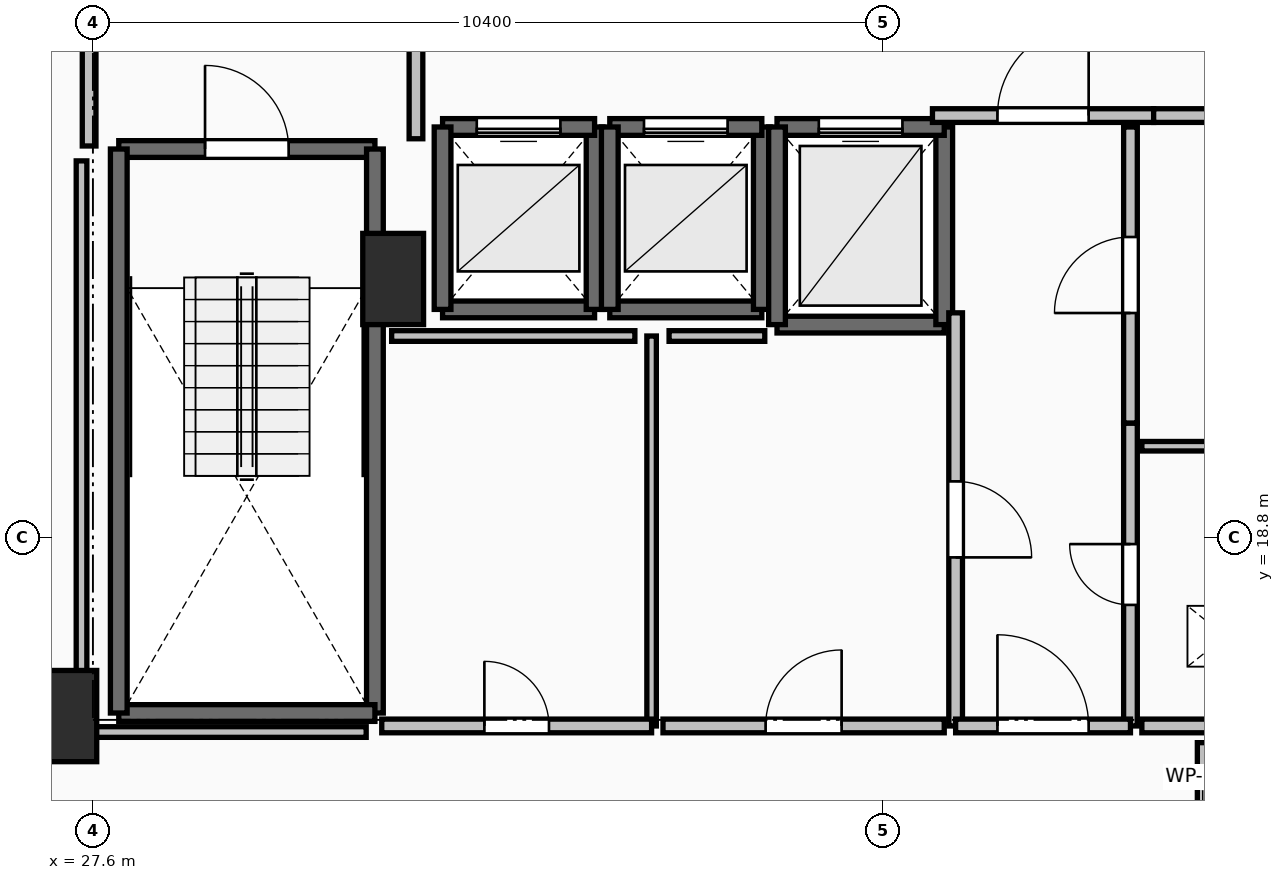
"""IFC4 building model, lengths in metres.
Left out: names, types, materials, properties, quantities, classifications, styles, units other than length and angle.
Written with IfcOpenShell. Run it as: python <this file> out.ifc"""

import sys

from ifc_helpers import new_model, si_unit, direction, frame, frame_2d, origin, origin_2d, place, context, subcontext, project, spatial, rectangle, extrude, element, fill, save


model = new_model("IFC4")
c1 = context("Model", 3, precision=1e-05, world=origin(), true_north=direction((0.0, 1.0)))
c2 = subcontext(c1, "Body", "Model", "MODEL_VIEW")
j1 = project(units=[si_unit("LENGTHUNIT", "METRE"), si_unit("PLANEANGLEUNIT", "RADIAN")], contexts=[c1])
p1 = place(None, origin())
s1 = spatial("IfcSite", under=j1, at=p1, CompositionType="ELEMENT")
p2 = place(p1, origin())
s2 = spatial("IfcBuilding", under=s1, at=p2, CompositionType="ELEMENT")
p3 = place(p2, frame((0.0, 0.0, 132.6)))
s3 = spatial("IfcBuildingStorey", under=s2, at=p3, CompositionType="ELEMENT", Elevation=132.6)
for number, where, z_axis, x_axis in (
    (1, (27.25, 16.45, 0.0), (0.0, 0.0, 1.0), (1.0, 0.0, 0.0)),
    (2, (31.55, 22.2, 0.0), (0.0, 0.0, 1.0), (1.0, 0.0, 0.0)),
):
    element("IfcColumn", number, at=place(p3, frame(where, z_axis=z_axis, x_axis=x_axis)), inside=s3, PredefinedType="PILASTER", context=c2, shape_type="SweptSolid", body=[
        extrude(rectangle(XDim=0.8, YDim=1.2, at=origin_2d()), origin(), (0.0, 0.0, 1.0), 3.5),
    ])
p4 = place(p3, frame((27.94, 23.91, 0.0), z_axis=(0.0, 0.0, 1.0), x_axis=(1.0, 0.0, 0.0)))
e3 = element("IfcWall", 3, at=p4, inside=s3, PredefinedType="SOLIDWALL", context=c2, shape_type="SweptSolid", body=[
    extrude(rectangle(XDim=3.37, YDim=0.22, at=frame_2d((1.685, 0.0))), origin(), (0.0, 0.0, 1.0), 3.24),
])
p5 = place(p4, frame((1.135, 0.0, 0.0)))
e4 = element("IfcOpeningElement", 4, at=p5, cuts=e3, PredefinedType="OPENING", context=c2, shape_type="SweptSolid", body=[
    extrude(rectangle(XDim=1.1, YDim=2.15, at=frame_2d((0.55, 1.075))), frame((0.0, 0.125, 0.0), z_axis=(0.0, -1.0, 0.0), x_axis=(1.0, 0.0, 0.0)), (0.0, 0.0, 1.0), 0.25),
])
p6 = place(p3, frame((31.31, 23.91, 0.0), z_axis=(0.0, 0.0, 1.0), x_axis=(0.0, -1.0, 0.0)))
e5 = element("IfcWall", 5, at=p6, inside=s3, PredefinedType="SOLIDWALL", context=c2, shape_type="SweptSolid", body=[
    extrude(rectangle(XDim=7.42, YDim=0.22, at=frame_2d((3.71, 0.0))), origin(), (0.0, 0.0, 1.0), 3.24),
])
p7 = place(p3, frame((31.31, 16.49, 0.0), z_axis=(0.0, 0.0, 1.0), x_axis=(-1.0, 0.0, 0.0)))
e6 = element("IfcWall", 6, at=p7, inside=s3, PredefinedType="SOLIDWALL", context=c2, shape_type="SweptSolid", body=[
    extrude(rectangle(XDim=3.37, YDim=0.22, at=frame_2d((1.685, 0.0))), origin(), (0.0, 0.0, 1.0), 3.24),
])
p8 = place(p3, frame((27.94, 16.49, 0.0), z_axis=(0.0, 0.0, 1.0), x_axis=(0.0, 1.0, 0.0)))
e7 = element("IfcWall", 7, at=p8, inside=s3, PredefinedType="SOLIDWALL", context=c2, shape_type="SweptSolid", body=[
    extrude(rectangle(XDim=7.42, YDim=0.22, at=frame_2d((3.71, 0.0))), origin(), (0.0, 0.0, 1.0), 3.24),
])
p9 = place(p3, frame((32.2, 21.8, 0.0), z_axis=(0.0, 0.0, 1.0), x_axis=(1.0, 0.0, 0.0)))
e8 = element("IfcWall", 8, at=p9, inside=s3, PredefinedType="SOLIDWALL", context=c2, shape_type="SweptSolid", body=[
    extrude(rectangle(XDim=2.0, YDim=0.22, at=frame_2d((1.0, 0.0))), origin(), (0.0, 0.0, 1.0), 3.24),
])
p10 = place(p3, frame((34.2, 21.8, 0.0), z_axis=(0.0, 0.0, 1.0), x_axis=(0.0, 1.0, 0.0)))
e9 = element("IfcWall", 9, at=p10, inside=s3, PredefinedType="SOLIDWALL", context=c2, shape_type="SweptSolid", body=[
    extrude(rectangle(XDim=2.4, YDim=0.22, at=frame_2d((1.2, 0.0))), origin(), (0.0, 0.0, 1.0), 3.24),
])
p11 = place(p3, frame((34.2, 24.2, 0.0), z_axis=(0.0, 0.0, 1.0), x_axis=(-1.0, 0.0, 0.0)))
e10 = element("IfcWall", 10, at=p11, inside=s3, PredefinedType="SOLIDWALL", context=c2, shape_type="SweptSolid", body=[
    extrude(rectangle(XDim=2.0, YDim=0.22, at=frame_2d((1.0, 0.0))), origin(), (0.0, 0.0, 1.0), 3.24),
])
p12 = place(p11, frame((0.45, 0.0, 0.0)))
e11 = element("IfcOpeningElement", 11, at=p12, cuts=e10, PredefinedType="OPENING", context=c2, shape_type="SweptSolid", body=[
    extrude(rectangle(XDim=1.1, YDim=2.2, at=frame_2d((0.55, 1.1))), frame((0.0, 0.125, 0.0), z_axis=(0.0, -1.0, 0.0), x_axis=(1.0, 0.0, 0.0)), (0.0, 0.0, 1.0), 0.25),
])
p13 = place(p3, frame((32.2, 24.2, 0.0), z_axis=(0.0, 0.0, 1.0), x_axis=(0.0, -1.0, 0.0)))
e12 = element("IfcWall", 12, at=p13, inside=s3, PredefinedType="SOLIDWALL", context=c2, shape_type="SweptSolid", body=[
    extrude(rectangle(XDim=2.4, YDim=0.22, at=frame_2d((1.2, 0.0))), origin(), (0.0, 0.0, 1.0), 3.24),
])
p14 = place(p3, frame((34.4, 21.8, 0.0), z_axis=(0.0, 0.0, 1.0), x_axis=(1.0, 0.0, 0.0)))
e13 = element("IfcWall", 13, at=p14, inside=s3, PredefinedType="SOLIDWALL", context=c2, shape_type="SweptSolid", body=[
    extrude(rectangle(XDim=2.0, YDim=0.22, at=frame_2d((1.0, 0.0))), origin(), (0.0, 0.0, 1.0), 3.24),
])
p15 = place(p3, frame((36.4, 21.8, 0.0), z_axis=(0.0, 0.0, 1.0), x_axis=(0.0, 1.0, 0.0)))
e14 = element("IfcWall", 14, at=p15, inside=s3, PredefinedType="SOLIDWALL", context=c2, shape_type="SweptSolid", body=[
    extrude(rectangle(XDim=2.4, YDim=0.22, at=frame_2d((1.2, 0.0))), origin(), (0.0, 0.0, 1.0), 3.24),
])
p16 = place(p3, frame((36.4, 24.2, 0.0), z_axis=(0.0, 0.0, 1.0), x_axis=(-1.0, 0.0, 0.0)))
e15 = element("IfcWall", 15, at=p16, inside=s3, PredefinedType="SOLIDWALL", context=c2, shape_type="SweptSolid", body=[
    extrude(rectangle(XDim=2.0, YDim=0.22, at=frame_2d((1.0, 0.0))), origin(), (0.0, 0.0, 1.0), 3.24),
])
p17 = place(p16, frame((0.45, 0.0, 0.0)))
e16 = element("IfcOpeningElement", 16, at=p17, cuts=e15, PredefinedType="OPENING", context=c2, shape_type="SweptSolid", body=[
    extrude(rectangle(XDim=1.1, YDim=2.2, at=frame_2d((0.55, 1.1))), frame((0.0, 0.125, 0.0), z_axis=(0.0, -1.0, 0.0), x_axis=(1.0, 0.0, 0.0)), (0.0, 0.0, 1.0), 0.25),
])
p18 = place(p3, frame((34.4, 24.2, 0.0), z_axis=(0.0, 0.0, 1.0), x_axis=(0.0, -1.0, 0.0)))
e17 = element("IfcWall", 17, at=p18, inside=s3, PredefinedType="SOLIDWALL", context=c2, shape_type="SweptSolid", body=[
    extrude(rectangle(XDim=2.4, YDim=0.22, at=frame_2d((1.2, 0.0))), origin(), (0.0, 0.0, 1.0), 3.24),
])
p19 = place(p3, frame((36.6, 21.6, 0.0), z_axis=(0.0, 0.0, 1.0), x_axis=(1.0, 0.0, 0.0)))
e18 = element("IfcWall", 18, at=p19, inside=s3, PredefinedType="SOLIDWALL", context=c2, shape_type="SweptSolid", body=[
    extrude(rectangle(XDim=2.2, YDim=0.22, at=frame_2d((1.1, 0.0))), origin(), (0.0, 0.0, 1.0), 3.24),
])
p20 = place(p3, frame((38.8, 21.6, 0.0), z_axis=(0.0, 0.0, 1.0), x_axis=(0.0, 1.0, 0.0)))
e19 = element("IfcWall", 19, at=p20, inside=s3, PredefinedType="SOLIDWALL", context=c2, shape_type="SweptSolid", body=[
    extrude(rectangle(XDim=2.6, YDim=0.22, at=frame_2d((1.3, 0.0))), origin(), (0.0, 0.0, 1.0), 3.24),
])
p21 = place(p3, frame((38.8, 24.2, 0.0), z_axis=(0.0, 0.0, 1.0), x_axis=(-1.0, 0.0, 0.0)))
e20 = element("IfcWall", 20, at=p21, inside=s3, PredefinedType="SOLIDWALL", context=c2, shape_type="SweptSolid", body=[
    extrude(rectangle(XDim=2.2, YDim=0.22, at=frame_2d((1.1, 0.0))), origin(), (0.0, 0.0, 1.0), 3.24),
])
p22 = place(p21, frame((0.55, 0.0, 0.0)))
e21 = element("IfcOpeningElement", 21, at=p22, cuts=e20, PredefinedType="OPENING", context=c2, shape_type="SweptSolid", body=[
    extrude(rectangle(XDim=1.1, YDim=2.2, at=frame_2d((0.55, 1.1))), frame((0.0, 0.125, 0.0), z_axis=(0.0, -1.0, 0.0), x_axis=(1.0, 0.0, 0.0)), (0.0, 0.0, 1.0), 0.25),
])
p23 = place(p3, frame((36.6, 24.2, 0.0), z_axis=(0.0, 0.0, 1.0), x_axis=(0.0, -1.0, 0.0)))
e22 = element("IfcWall", 22, at=p23, inside=s3, PredefinedType="SOLIDWALL", context=c2, shape_type="SweptSolid", body=[
    extrude(rectangle(XDim=2.6, YDim=0.22, at=frame_2d((1.3, 0.0))), origin(), (0.0, 0.0, 1.0), 3.24),
])
p24 = place(p3, frame((31.85, 24.045, 0.0), z_axis=(0.0, 0.0, 1.0), x_axis=(0.0, 1.0, 0.0)))
e23 = element("IfcWall", 23, at=p24, inside=s3, PredefinedType="PARTITIONING", context=c2, shape_type="SweptSolid", body=[
    extrude(rectangle(XDim=3.91, YDim=0.18, at=frame_2d((1.955, 0.0))), origin(), (0.0, 0.0, 1.0), 3.24),
])
p25 = place(p24, frame((1.355, 0.0, 0.0)))
e24 = element("IfcOpeningElement", 24, at=p25, cuts=e23, PredefinedType="OPENING", context=c2, shape_type="SweptSolid", body=[
    extrude(rectangle(XDim=1.2, YDim=2.15, at=frame_2d((0.6, 1.075))), frame((0.0, 0.105, 0.0), z_axis=(0.0, -1.0, 0.0), x_axis=(1.0, 0.0, 0.0)), (0.0, 0.0, 1.0), 0.21),
])
p26 = place(p3, frame((27.55, 28.0, 0.0), z_axis=(0.0, 0.0, 1.0), x_axis=(0.0, -1.0, 0.0)))
e25 = element("IfcWall", 25, at=p26, inside=s3, PredefinedType="PARTITIONING", context=c2, shape_type="SweptSolid", body=[
    extrude(rectangle(XDim=4.05, YDim=0.18, at=frame_2d((2.025, 0.0))), origin(), (0.0, 0.0, 1.0), 3.24),
])
p27 = place(p26, frame((1.425, 0.0, 0.0)))
e26 = element("IfcOpeningElement", 26, at=p27, cuts=e25, PredefinedType="OPENING", context=c2, shape_type="SweptSolid", body=[
    extrude(rectangle(XDim=1.2, YDim=2.15, at=frame_2d((0.6, 1.075))), frame((0.0, 0.105, 0.0), z_axis=(0.0, -1.0, 0.0), x_axis=(1.0, 0.0, 0.0)), (0.0, 0.0, 1.0), 0.21),
])
p28 = place(p3, frame((38.645, 24.35, 0.0), z_axis=(0.0, 0.0, 1.0), x_axis=(1.0, 0.0, 0.0)))
e27 = element("IfcWall", 27, at=p28, inside=s3, PredefinedType="PARTITIONING", context=c2, shape_type="SweptSolid", body=[
    extrude(rectangle(XDim=2.91, YDim=0.18, at=frame_2d((1.455, 0.0))), origin(), (0.0, 0.0, 1.0), 3.24),
])
p29 = place(p28, frame((0.855, 0.0, 0.0)))
e28 = element("IfcOpeningElement", 28, at=p29, cuts=e27, PredefinedType="OPENING", context=c2, shape_type="SweptSolid", body=[
    extrude(rectangle(XDim=1.2, YDim=2.15, at=frame_2d((0.6, 1.075))), frame((0.0, 0.105, 0.0), z_axis=(0.0, -1.0, 0.0), x_axis=(1.0, 0.0, 0.0)), (0.0, 0.0, 1.0), 0.21),
])
p30 = place(p3, frame((41.555, 24.35, 0.0), z_axis=(0.0, 0.0, 1.0), x_axis=(1.0, 0.0, 0.0)))
e29 = element("IfcWall", 29, at=p30, inside=s3, PredefinedType="PARTITIONING", context=c2, shape_type="SweptSolid", body=[
    extrude(rectangle(XDim=2.445, YDim=0.18, at=frame_2d((1.223, 0.0))), origin(), (0.0, 0.0, 1.0), 3.24),
])
p31 = place(p30, frame((0.722, 0.0, 0.0)))
e30 = element("IfcOpeningElement", 30, at=p31, cuts=e29, PredefinedType="OPENING", context=c2, shape_type="SweptSolid", body=[
    extrude(rectangle(XDim=1.0, YDim=2.15, at=frame_2d((0.5, 1.075))), frame((0.0, 0.105, 0.0), z_axis=(0.0, -1.0, 0.0), x_axis=(1.0, 0.0, 0.0)), (0.0, 0.0, 1.0), 0.21),
])
p32 = place(p3, frame((41.25, 16.32, 0.0), z_axis=(0.0, 0.0, 1.0), x_axis=(0.0, 1.0, 0.0)))
e31 = element("IfcWall", 31, at=p32, inside=s3, PredefinedType="PARTITIONING", context=c2, shape_type="SweptSolid", body=[
    extrude(rectangle(XDim=3.985, YDim=0.18, at=frame_2d((1.992, 0.0))), origin(), (0.0, 0.0, 1.0), 3.24),
])
p33 = place(p32, frame((1.593, 0.0, 0.0)))
e32 = element("IfcOpeningElement", 32, at=p33, cuts=e31, PredefinedType="OPENING", context=c2, shape_type="SweptSolid", body=[
    extrude(rectangle(XDim=0.8, YDim=2.05, at=frame_2d((0.4, 1.025))), frame((0.0, 0.105, 0.0), z_axis=(0.0, -1.0, 0.0), x_axis=(1.0, 0.0, 0.0)), (0.0, 0.0, 1.0), 0.21),
])
p34 = place(p3, frame((41.25, 20.305, 0.0), z_axis=(0.0, 0.0, 1.0), x_axis=(0.0, 1.0, 0.0)))
e33 = element("IfcWall", 33, at=p34, inside=s3, PredefinedType="PARTITIONING", context=c2, shape_type="SweptSolid", body=[
    extrude(rectangle(XDim=3.895, YDim=0.18, at=frame_2d((1.948, 0.0))), origin(), (0.0, 0.0, 1.0), 3.24),
])
p35 = place(p34, frame((1.448, 0.0, 0.0)))
e34 = element("IfcOpeningElement", 34, at=p35, cuts=e33, PredefinedType="OPENING", context=c2, shape_type="SweptSolid", body=[
    extrude(rectangle(XDim=1.0, YDim=2.15, at=frame_2d((0.5, 1.075))), frame((0.0, 0.105, 0.0), z_axis=(0.0, -1.0, 0.0), x_axis=(1.0, 0.0, 0.0)), (0.0, 0.0, 1.0), 0.21),
])
p36 = place(p3, frame((38.95, 21.755, 0.0), z_axis=(0.0, 0.0, 1.0), x_axis=(0.0, -1.0, 0.0)))
e35 = element("IfcWall", 35, at=p36, inside=s3, PredefinedType="PARTITIONING", context=c2, shape_type="SweptSolid", body=[
    extrude(rectangle(XDim=5.435, YDim=0.18, at=frame_2d((2.717, 0.0))), origin(), (0.0, 0.0, 1.0), 3.24),
])
p37 = place(p36, frame((2.218, 0.0, 0.0)))
e36 = element("IfcOpeningElement", 36, at=p37, cuts=e35, PredefinedType="OPENING", context=c2, shape_type="SweptSolid", body=[
    extrude(rectangle(XDim=1.0, YDim=2.15, at=frame_2d((0.5, 1.075))), frame((0.0, 0.105, 0.0), z_axis=(0.0, -1.0, 0.0), x_axis=(1.0, 0.0, 0.0)), (0.0, 0.0, 1.0), 0.21),
])
p38 = place(p3, frame((38.95, 16.32, 0.0), z_axis=(0.0, 0.0, 1.0), x_axis=(1.0, 0.0, 0.0)))
e37 = element("IfcWall", 37, at=p38, inside=s3, PredefinedType="PARTITIONING", context=c2, shape_type="SweptSolid", body=[
    extrude(rectangle(XDim=2.3, YDim=0.18, at=frame_2d((1.15, 0.0))), origin(), (0.0, 0.0, 1.0), 3.24),
])
p39 = place(p38, frame((0.55, 0.0, 0.0)))
e38 = element("IfcOpeningElement", 38, at=p39, cuts=e37, PredefinedType="OPENING", context=c2, shape_type="SweptSolid", body=[
    extrude(rectangle(XDim=1.2, YDim=2.15, at=frame_2d((0.6, 1.075))), frame((0.0, 0.105, 0.0), z_axis=(0.0, -1.0, 0.0), x_axis=(1.0, 0.0, 0.0)), (0.0, 0.0, 1.0), 0.21),
])
p40 = place(p3, frame((44.6, 20.0, 0.0), z_axis=(0.0, 0.0, 1.0), x_axis=(-1.0, 0.0, 0.0)))
e39 = element("IfcWall", 39, at=p40, inside=s3, PredefinedType="PARTITIONING", context=c2, shape_type="SweptSolid", body=[
    extrude(rectangle(XDim=3.2, YDim=0.125, at=frame_2d((1.6, 0.0))), origin(), (0.0, 0.0, 1.0), 3.24),
])
p41 = place(p3, frame((41.4, 16.32, 0.0), z_axis=(0.0, 0.0, 1.0), x_axis=(1.0, 0.0, 0.0)))
e40 = element("IfcWall", 40, at=p41, inside=s3, PredefinedType="PARTITIONING", context=c2, shape_type="SweptSolid", body=[
    extrude(rectangle(XDim=3.2, YDim=0.18, at=frame_2d((1.6, 0.0))), origin(), (0.0, 0.0, 1.0), 3.24),
])
p42 = place(p41, frame((1.2, 0.0, 0.0)))
e41 = element("IfcOpeningElement", 41, at=p42, cuts=e40, PredefinedType="OPENING", context=c2, shape_type="SweptSolid", body=[
    extrude(rectangle(XDim=0.8, YDim=2.05, at=frame_2d((0.4, 1.025))), frame((0.0, 0.105, 0.0), z_axis=(0.0, -1.0, 0.0), x_axis=(1.0, 0.0, 0.0)), (0.0, 0.0, 1.0), 0.21),
])
p43 = place(p3, frame((34.95, 16.32, 0.0), z_axis=(0.0, 0.0, 1.0), x_axis=(0.0, 1.0, 0.0)))
e42 = element("IfcWall", 42, at=p43, inside=s3, PredefinedType="PARTITIONING", context=c2, shape_type="SweptSolid", body=[
    extrude(rectangle(XDim=5.13, YDim=0.125, at=frame_2d((2.565, 0.0))), origin(), (0.0, 0.0, 1.0), 3.24),
])
p44 = place(p3, frame((31.4, 16.32, 0.0), z_axis=(0.0, 0.0, 1.0), x_axis=(1.0, 0.0, 0.0)))
e43 = element("IfcWall", 43, at=p44, inside=s3, PredefinedType="PARTITIONING", context=c2, shape_type="SweptSolid", body=[
    extrude(rectangle(XDim=3.55, YDim=0.18, at=frame_2d((1.775, 0.0))), origin(), (0.0, 0.0, 1.0), 3.24),
])
p45 = place(p44, frame((1.35, 0.0, 0.0)))
e44 = element("IfcOpeningElement", 44, at=p45, cuts=e43, PredefinedType="OPENING", context=c2, shape_type="SweptSolid", body=[
    extrude(rectangle(XDim=0.85, YDim=2.1, at=frame_2d((0.425, 1.05))), frame((0.0, 0.105, 0.0), z_axis=(0.0, -1.0, 0.0), x_axis=(1.0, 0.0, 0.0)), (0.0, 0.0, 1.0), 0.21),
])
p46 = place(p3, frame((35.1, 16.32, 0.0), z_axis=(0.0, 0.0, 1.0), x_axis=(1.0, 0.0, 0.0)))
e45 = element("IfcWall", 45, at=p46, inside=s3, PredefinedType="PARTITIONING", context=c2, shape_type="SweptSolid", body=[
    extrude(rectangle(XDim=3.7, YDim=0.18, at=frame_2d((1.85, 0.0))), origin(), (0.0, 0.0, 1.0), 3.24),
])
p47 = place(p46, frame((1.35, 0.0, 0.0)))
e46 = element("IfcOpeningElement", 46, at=p47, cuts=e45, PredefinedType="OPENING", context=c2, shape_type="SweptSolid", body=[
    extrude(rectangle(XDim=1.0, YDim=2.15, at=frame_2d((0.5, 1.075))), frame((0.0, 0.105, 0.0), z_axis=(0.0, -1.0, 0.0), x_axis=(1.0, 0.0, 0.0)), (0.0, 0.0, 1.0), 0.21),
])
p48 = place(p3, frame((34.73, 21.45, 0.0), z_axis=(0.0, 0.0, 1.0), x_axis=(-1.0, 0.0, 0.0)))
e47 = element("IfcWall", 47, at=p48, inside=s3, PredefinedType="PARTITIONING", context=c2, shape_type="SweptSolid", body=[
    extrude(rectangle(XDim=3.2, YDim=0.14, at=frame_2d((1.6, 0.0))), origin(), (0.0, 0.0, 1.0), 3.24),
])
p49 = place(p3, frame((36.439, 21.45, 0.0), z_axis=(0.0, 0.0, 1.0), x_axis=(-1.0, 0.0, 0.0)))
e48 = element("IfcWall", 48, at=p49, inside=s3, PredefinedType="PARTITIONING", context=c2, shape_type="SweptSolid", body=[
    extrude(rectangle(XDim=1.259, YDim=0.14, at=frame_2d((0.629, 0.0))), origin(), (0.0, 0.0, 1.0), 3.24),
])
p50 = place(p3, frame((27.45, 23.754, 0.0), z_axis=(0.0, 0.0, 1.0), x_axis=(0.0, -1.0, 0.0)))
e49 = element("IfcWall", 49, at=p50, inside=s3, PredefinedType="PARTITIONING", context=c2, shape_type="SweptSolid", body=[
    extrude(rectangle(XDim=7.514, YDim=0.14, at=frame_2d((3.757, 0.0))), origin(), (0.0, 0.0, 1.0), 2.432),
])
p51 = place(p3, frame((27.45, 16.24, 0.0), z_axis=(0.0, 0.0, 1.0), x_axis=(1.0, 0.0, 0.0)))
e50 = element("IfcWall", 50, at=p51, inside=s3, PredefinedType="PARTITIONING", context=c2, shape_type="SweptSolid", body=[
    extrude(rectangle(XDim=3.745, YDim=0.14, at=frame_2d((1.873, 0.0))), origin(), (0.0, 0.0, 1.0), 2.432),
])
p52 = place(p3, frame((42.2, 16.1, 0.0), z_axis=(0.0, 0.0, 1.0), x_axis=(0.0, -1.0, 0.0)))
e51 = element("IfcWall", 51, at=p52, inside=s3, PredefinedType="PARTITIONING", context=c2, shape_type="SweptSolid", body=[
    extrude(rectangle(XDim=1.83, YDim=0.14, at=frame_2d((0.915, 0.0))), origin(), (0.0, 0.0, 1.0), 3.24),
])
p53 = place(p5, origin())
e52 = element("IfcDoor", 52, at=p53, inside=s3, OperationType="SINGLE_SWING_LEFT", PredefinedType="DOOR", context=c2, shape_type="SweptSolid", body=[
    extrude(rectangle(XDim=1.1, YDim=2.15, at=frame_2d((0.55, 1.075))), frame((0.0, 0.025, 0.0), z_axis=(0.0, -1.0, 0.0), x_axis=(1.0, 0.0, 0.0)), (0.0, 0.0, 1.0), 0.05),
])
fill(e4, e52)
p54 = place(p12, origin())
e53 = element("IfcDoor", 53, at=p54, inside=s3, OperationType="SLIDING_TO_LEFT", PredefinedType="DOOR", context=c2, shape_type="SweptSolid", body=[
    extrude(rectangle(XDim=1.1, YDim=2.2, at=frame_2d((0.55, 1.1))), frame((0.0, 0.025, 0.0), z_axis=(0.0, -1.0, 0.0), x_axis=(1.0, 0.0, 0.0)), (0.0, 0.0, 1.0), 0.05),
])
fill(e11, e53)
p55 = place(p17, origin())
e54 = element("IfcDoor", 54, at=p55, inside=s3, OperationType="SLIDING_TO_LEFT", PredefinedType="DOOR", context=c2, shape_type="SweptSolid", body=[
    extrude(rectangle(XDim=1.1, YDim=2.2, at=frame_2d((0.55, 1.1))), frame((0.0, 0.025, 0.0), z_axis=(0.0, -1.0, 0.0), x_axis=(1.0, 0.0, 0.0)), (0.0, 0.0, 1.0), 0.05),
])
fill(e16, e54)
p56 = place(p22, origin())
e55 = element("IfcDoor", 55, at=p56, inside=s3, OperationType="SLIDING_TO_LEFT", PredefinedType="DOOR", context=c2, shape_type="SweptSolid", body=[
    extrude(rectangle(XDim=1.1, YDim=2.2, at=frame_2d((0.55, 1.1))), frame((0.0, 0.025, 0.0), z_axis=(0.0, -1.0, 0.0), x_axis=(1.0, 0.0, 0.0)), (0.0, 0.0, 1.0), 0.05),
])
fill(e21, e55)
p57 = place(p29, origin())
e56 = element("IfcDoor", 56, at=p57, inside=s3, OperationType="SINGLE_SWING_RIGHT", PredefinedType="DOOR", context=c2, shape_type="SweptSolid", body=[
    extrude(rectangle(XDim=1.2, YDim=2.15, at=frame_2d((0.6, 1.075))), frame((0.0, 0.025, 0.0), z_axis=(0.0, -1.0, 0.0), x_axis=(1.0, 0.0, 0.0)), (0.0, 0.0, 1.0), 0.05),
])
fill(e28, e56)
p58 = place(p33, origin())
e57 = element("IfcDoor", 57, at=p58, inside=s3, OperationType="SINGLE_SWING_RIGHT", PredefinedType="DOOR", context=c2, shape_type="SweptSolid", body=[
    extrude(rectangle(XDim=0.8, YDim=2.05, at=frame_2d((0.4, 1.025))), frame((0.0, 0.025, 0.0), z_axis=(0.0, -1.0, 0.0), x_axis=(1.0, 0.0, 0.0)), (0.0, 0.0, 1.0), 0.05),
])
fill(e32, e57)
p59 = place(p35, origin())
e58 = element("IfcDoor", 58, at=p59, inside=s3, OperationType="SINGLE_SWING_LEFT", PredefinedType="DOOR", context=c2, shape_type="SweptSolid", body=[
    extrude(rectangle(XDim=1.0, YDim=2.15, at=frame_2d((0.5, 1.075))), frame((0.0, 0.025, 0.0), z_axis=(0.0, -1.0, 0.0), x_axis=(1.0, 0.0, 0.0)), (0.0, 0.0, 1.0), 0.05),
])
fill(e34, e58)
p60 = place(p37, origin())
e59 = element("IfcDoor", 59, at=p60, inside=s3, OperationType="SINGLE_SWING_RIGHT", PredefinedType="DOOR", context=c2, shape_type="SweptSolid", body=[
    extrude(rectangle(XDim=1.0, YDim=2.15, at=frame_2d((0.5, 1.075))), frame((0.0, 0.025, 0.0), z_axis=(0.0, -1.0, 0.0), x_axis=(1.0, 0.0, 0.0)), (0.0, 0.0, 1.0), 0.05),
])
fill(e36, e59)
p61 = place(p39, origin())
e60 = element("IfcDoor", 60, at=p61, inside=s3, OperationType="SINGLE_SWING_LEFT", PredefinedType="DOOR", context=c2, shape_type="SweptSolid", body=[
    extrude(rectangle(XDim=1.2, YDim=2.15, at=frame_2d((0.6, 1.075))), frame((0.0, 0.025, 0.0), z_axis=(0.0, -1.0, 0.0), x_axis=(1.0, 0.0, 0.0)), (0.0, 0.0, 1.0), 0.05),
])
fill(e38, e60)
p62 = place(p45, origin())
e61 = element("IfcDoor", 61, at=p62, inside=s3, OperationType="SINGLE_SWING_LEFT", PredefinedType="DOOR", context=c2, shape_type="SweptSolid", body=[
    extrude(rectangle(XDim=0.85, YDim=2.1, at=frame_2d((0.425, 1.05))), frame((0.0, 0.025, 0.0), z_axis=(0.0, -1.0, 0.0), x_axis=(1.0, 0.0, 0.0)), (0.0, 0.0, 1.0), 0.05),
])
fill(e44, e61)
p63 = place(p47, origin())
e62 = element("IfcDoor", 62, at=p63, inside=s3, OperationType="SINGLE_SWING_RIGHT", PredefinedType="DOOR", context=c2, shape_type="SweptSolid", body=[
    extrude(rectangle(XDim=1.0, YDim=2.15, at=frame_2d((0.5, 1.075))), frame((0.0, 0.025, 0.0), z_axis=(0.0, -1.0, 0.0), x_axis=(1.0, 0.0, 0.0)), (0.0, 0.0, 1.0), 0.05),
])
fill(e46, e62)
save(model, sys.argv[1])
